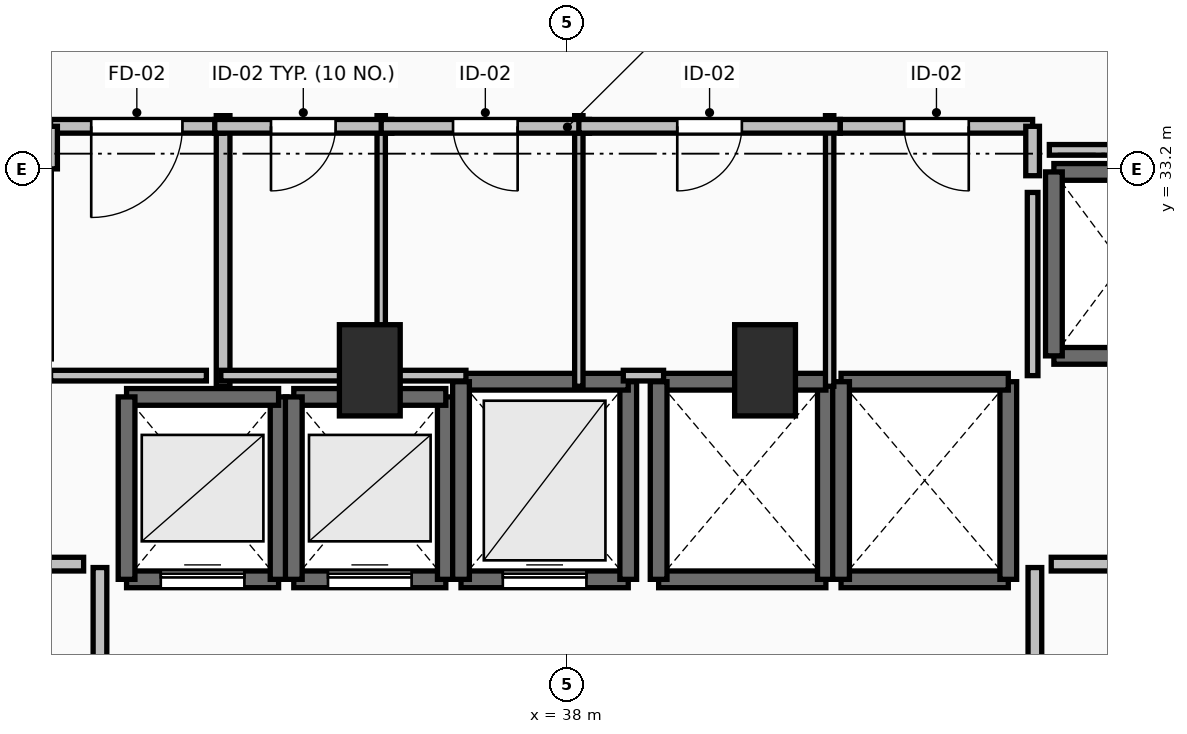
"""IFC4 building model, lengths in metres.
Left out: names, types, materials, properties, quantities, classifications, styles, units other than length and angle.
Written with IfcOpenShell. Run it as: python <this file> out.ifc"""

import sys

from ifc_helpers import new_model, si_unit, direction, frame, frame_2d, origin, origin_2d, place, context, subcontext, project, spatial, rectangle, extrude, element, fill, save


model = new_model("IFC4")
c1 = context("Model", 3, precision=1e-05, world=origin(), true_north=direction((0.0, 1.0)))
c2 = subcontext(c1, "Body", "Model", "MODEL_VIEW")
j1 = project(units=[si_unit("LENGTHUNIT", "METRE"), si_unit("PLANEANGLEUNIT", "RADIAN")], contexts=[c1])
p1 = place(None, origin())
s1 = spatial("IfcSite", under=j1, at=p1, CompositionType="ELEMENT")
p2 = place(p1, origin())
s2 = spatial("IfcBuilding", under=s1, at=p2, CompositionType="ELEMENT")
p3 = place(p2, frame((0.0, 0.0, 41.5)))
s3 = spatial("IfcBuildingStorey", under=s2, at=p3, CompositionType="ELEMENT", Elevation=41.5)
for number, where, z_axis, x_axis in (
    (1, (35.4, 30.55, 0.0), (0.0, 0.0, 1.0), (1.0, 0.0, 0.0)),
    (2, (40.6, 30.55, 0.0), (0.0, 0.0, 1.0), (1.0, 0.0, 0.0)),
):
    element("IfcColumn", number, at=place(p3, frame(where, z_axis=z_axis, x_axis=x_axis)), inside=s3, PredefinedType="PILASTER", context=c2, shape_type="SweptSolid", body=[
        extrude(rectangle(XDim=0.8, YDim=1.2, at=origin_2d()), origin(), (0.0, 0.0, 1.0), 3.5),
    ])
p4 = place(p3, frame((32.2, 27.8, 0.0), z_axis=(0.0, 0.0, 1.0), x_axis=(1.0, 0.0, 0.0)))
e3 = element("IfcWall", 3, at=p4, inside=s3, PredefinedType="SOLIDWALL", context=c2, shape_type="SweptSolid", body=[
    extrude(rectangle(XDim=2.0, YDim=0.22, at=frame_2d((1.0, 0.0))), origin(), (0.0, 0.0, 1.0), 3.24),
])
p5 = place(p4, frame((0.45, 0.0, 0.0)))
e4 = element("IfcOpeningElement", 4, at=p5, cuts=e3, PredefinedType="OPENING", context=c2, shape_type="SweptSolid", body=[
    extrude(rectangle(XDim=1.1, YDim=2.2, at=frame_2d((0.55, 1.1))), frame((0.0, 0.125, 0.0), z_axis=(0.0, -1.0, 0.0), x_axis=(1.0, 0.0, 0.0)), (0.0, 0.0, 1.0), 0.25),
])
p6 = place(p3, frame((34.2, 27.8, 0.0), z_axis=(0.0, 0.0, 1.0), x_axis=(0.0, 1.0, 0.0)))
e5 = element("IfcWall", 5, at=p6, inside=s3, PredefinedType="SOLIDWALL", context=c2, shape_type="SweptSolid", body=[
    extrude(rectangle(XDim=2.4, YDim=0.22, at=frame_2d((1.2, 0.0))), origin(), (0.0, 0.0, 1.0), 3.24),
])
p7 = place(p3, frame((34.2, 30.2, 0.0), z_axis=(0.0, 0.0, 1.0), x_axis=(-1.0, 0.0, 0.0)))
e6 = element("IfcWall", 6, at=p7, inside=s3, PredefinedType="SOLIDWALL", context=c2, shape_type="SweptSolid", body=[
    extrude(rectangle(XDim=2.0, YDim=0.22, at=frame_2d((1.0, 0.0))), origin(), (0.0, 0.0, 1.0), 3.24),
])
p8 = place(p3, frame((32.2, 30.2, 0.0), z_axis=(0.0, 0.0, 1.0), x_axis=(0.0, -1.0, 0.0)))
e7 = element("IfcWall", 7, at=p8, inside=s3, PredefinedType="SOLIDWALL", context=c2, shape_type="SweptSolid", body=[
    extrude(rectangle(XDim=2.4, YDim=0.22, at=frame_2d((1.2, 0.0))), origin(), (0.0, 0.0, 1.0), 3.24),
])
p9 = place(p3, frame((34.4, 27.8, 0.0), z_axis=(0.0, 0.0, 1.0), x_axis=(1.0, 0.0, 0.0)))
e8 = element("IfcWall", 8, at=p9, inside=s3, PredefinedType="SOLIDWALL", context=c2, shape_type="SweptSolid", body=[
    extrude(rectangle(XDim=2.0, YDim=0.22, at=frame_2d((1.0, 0.0))), origin(), (0.0, 0.0, 1.0), 3.24),
])
p10 = place(p9, frame((0.45, 0.0, 0.0)))
e9 = element("IfcOpeningElement", 9, at=p10, cuts=e8, PredefinedType="OPENING", context=c2, shape_type="SweptSolid", body=[
    extrude(rectangle(XDim=1.1, YDim=2.2, at=frame_2d((0.55, 1.1))), frame((0.0, 0.125, 0.0), z_axis=(0.0, -1.0, 0.0), x_axis=(1.0, 0.0, 0.0)), (0.0, 0.0, 1.0), 0.25),
])
p11 = place(p3, frame((36.4, 27.8, 0.0), z_axis=(0.0, 0.0, 1.0), x_axis=(0.0, 1.0, 0.0)))
e10 = element("IfcWall", 10, at=p11, inside=s3, PredefinedType="SOLIDWALL", context=c2, shape_type="SweptSolid", body=[
    extrude(rectangle(XDim=2.4, YDim=0.22, at=frame_2d((1.2, 0.0))), origin(), (0.0, 0.0, 1.0), 3.24),
])
p12 = place(p3, frame((36.4, 30.2, 0.0), z_axis=(0.0, 0.0, 1.0), x_axis=(-1.0, 0.0, 0.0)))
e11 = element("IfcWall", 11, at=p12, inside=s3, PredefinedType="SOLIDWALL", context=c2, shape_type="SweptSolid", body=[
    extrude(rectangle(XDim=2.0, YDim=0.22, at=frame_2d((1.0, 0.0))), origin(), (0.0, 0.0, 1.0), 3.24),
])
p13 = place(p3, frame((34.4, 30.2, 0.0), z_axis=(0.0, 0.0, 1.0), x_axis=(0.0, -1.0, 0.0)))
e12 = element("IfcWall", 12, at=p13, inside=s3, PredefinedType="SOLIDWALL", context=c2, shape_type="SweptSolid", body=[
    extrude(rectangle(XDim=2.4, YDim=0.22, at=frame_2d((1.2, 0.0))), origin(), (0.0, 0.0, 1.0), 3.24),
])
p14 = place(p3, frame((36.6, 27.8, 0.0), z_axis=(0.0, 0.0, 1.0), x_axis=(1.0, 0.0, 0.0)))
e13 = element("IfcWall", 13, at=p14, inside=s3, PredefinedType="SOLIDWALL", context=c2, shape_type="SweptSolid", body=[
    extrude(rectangle(XDim=2.2, YDim=0.22, at=frame_2d((1.1, 0.0))), origin(), (0.0, 0.0, 1.0), 3.24),
])
p15 = place(p14, frame((0.55, 0.0, 0.0)))
e14 = element("IfcOpeningElement", 14, at=p15, cuts=e13, PredefinedType="OPENING", context=c2, shape_type="SweptSolid", body=[
    extrude(rectangle(XDim=1.1, YDim=2.2, at=frame_2d((0.55, 1.1))), frame((0.0, 0.125, 0.0), z_axis=(0.0, -1.0, 0.0), x_axis=(1.0, 0.0, 0.0)), (0.0, 0.0, 1.0), 0.25),
])
p16 = place(p3, frame((38.8, 27.8, 0.0), z_axis=(0.0, 0.0, 1.0), x_axis=(0.0, 1.0, 0.0)))
e15 = element("IfcWall", 15, at=p16, inside=s3, PredefinedType="SOLIDWALL", context=c2, shape_type="SweptSolid", body=[
    extrude(rectangle(XDim=2.6, YDim=0.22, at=frame_2d((1.3, 0.0))), origin(), (0.0, 0.0, 1.0), 3.24),
])
p17 = place(p3, frame((38.8, 30.4, 0.0), z_axis=(0.0, 0.0, 1.0), x_axis=(-1.0, 0.0, 0.0)))
e16 = element("IfcWall", 16, at=p17, inside=s3, PredefinedType="SOLIDWALL", context=c2, shape_type="SweptSolid", body=[
    extrude(rectangle(XDim=2.2, YDim=0.22, at=frame_2d((1.1, 0.0))), origin(), (0.0, 0.0, 1.0), 3.24),
])
p18 = place(p3, frame((36.6, 30.4, 0.0), z_axis=(0.0, 0.0, 1.0), x_axis=(0.0, -1.0, 0.0)))
e17 = element("IfcWall", 17, at=p18, inside=s3, PredefinedType="SOLIDWALL", context=c2, shape_type="SweptSolid", body=[
    extrude(rectangle(XDim=2.6, YDim=0.22, at=frame_2d((1.3, 0.0))), origin(), (0.0, 0.0, 1.0), 3.24),
])
p19 = place(p3, frame((39.2, 27.8, 0.0), z_axis=(0.0, 0.0, 1.0), x_axis=(1.0, 0.0, 0.0)))
e18 = element("IfcWall", 18, at=p19, inside=s3, PredefinedType="SOLIDWALL", context=c2, shape_type="SweptSolid", body=[
    extrude(rectangle(XDim=2.2, YDim=0.22, at=frame_2d((1.1, 0.0))), origin(), (0.0, 0.0, 1.0), 3.24),
])
p20 = place(p3, frame((41.4, 27.8, 0.0), z_axis=(0.0, 0.0, 1.0), x_axis=(0.0, 1.0, 0.0)))
e19 = element("IfcWall", 19, at=p20, inside=s3, PredefinedType="SOLIDWALL", context=c2, shape_type="SweptSolid", body=[
    extrude(rectangle(XDim=2.6, YDim=0.22, at=frame_2d((1.3, 0.0))), origin(), (0.0, 0.0, 1.0), 3.24),
])
p21 = place(p3, frame((41.4, 30.4, 0.0), z_axis=(0.0, 0.0, 1.0), x_axis=(-1.0, 0.0, 0.0)))
e20 = element("IfcWall", 20, at=p21, inside=s3, PredefinedType="SOLIDWALL", context=c2, shape_type="SweptSolid", body=[
    extrude(rectangle(XDim=2.2, YDim=0.22, at=frame_2d((1.1, 0.0))), origin(), (0.0, 0.0, 1.0), 3.24),
])
p22 = place(p3, frame((39.2, 30.4, 0.0), z_axis=(0.0, 0.0, 1.0), x_axis=(0.0, -1.0, 0.0)))
e21 = element("IfcWall", 21, at=p22, inside=s3, PredefinedType="SOLIDWALL", context=c2, shape_type="SweptSolid", body=[
    extrude(rectangle(XDim=2.6, YDim=0.22, at=frame_2d((1.3, 0.0))), origin(), (0.0, 0.0, 1.0), 3.24),
])
p23 = place(p3, frame((41.6, 27.8, 0.0), z_axis=(0.0, 0.0, 1.0), x_axis=(1.0, 0.0, 0.0)))
e22 = element("IfcWall", 22, at=p23, inside=s3, PredefinedType="SOLIDWALL", context=c2, shape_type="SweptSolid", body=[
    extrude(rectangle(XDim=2.2, YDim=0.22, at=frame_2d((1.1, 0.0))), origin(), (0.0, 0.0, 1.0), 3.24),
])
p24 = place(p3, frame((43.8, 27.8, 0.0), z_axis=(0.0, 0.0, 1.0), x_axis=(0.0, 1.0, 0.0)))
e23 = element("IfcWall", 23, at=p24, inside=s3, PredefinedType="SOLIDWALL", context=c2, shape_type="SweptSolid", body=[
    extrude(rectangle(XDim=2.6, YDim=0.22, at=frame_2d((1.3, 0.0))), origin(), (0.0, 0.0, 1.0), 3.24),
])
p25 = place(p3, frame((43.8, 30.4, 0.0), z_axis=(0.0, 0.0, 1.0), x_axis=(-1.0, 0.0, 0.0)))
e24 = element("IfcWall", 24, at=p25, inside=s3, PredefinedType="SOLIDWALL", context=c2, shape_type="SweptSolid", body=[
    extrude(rectangle(XDim=2.2, YDim=0.22, at=frame_2d((1.1, 0.0))), origin(), (0.0, 0.0, 1.0), 3.24),
])
p26 = place(p3, frame((41.6, 30.4, 0.0), z_axis=(0.0, 0.0, 1.0), x_axis=(0.0, -1.0, 0.0)))
e25 = element("IfcWall", 25, at=p26, inside=s3, PredefinedType="SOLIDWALL", context=c2, shape_type="SweptSolid", body=[
    extrude(rectangle(XDim=2.6, YDim=0.22, at=frame_2d((1.3, 0.0))), origin(), (0.0, 0.0, 1.0), 3.24),
])
for number, where, z_axis, x_axis in (
    (26, (44.4, 30.74, 0.0), (0.0, 0.0, 1.0), (1.0, 0.0, 0.0)),
    (27, (46.2, 33.16, 0.0), (0.0, 0.0, 1.0), (-1.0, 0.0, 0.0)),
):
    element("IfcWall", number, at=place(p3, frame(where, z_axis=z_axis, x_axis=x_axis)), inside=s3, PredefinedType="SOLIDWALL", context=c2, shape_type="SweptSolid", body=[
        extrude(rectangle(XDim=1.8, YDim=0.22, at=frame_2d((0.9, 0.0))), origin(), (0.0, 0.0, 1.0), 3.24),
    ])
p27 = place(p3, frame((44.4, 33.16, 0.0), z_axis=(0.0, 0.0, 1.0), x_axis=(0.0, -1.0, 0.0)))
e28 = element("IfcWall", 28, at=p27, inside=s3, PredefinedType="SOLIDWALL", context=c2, shape_type="SweptSolid", body=[
    extrude(rectangle(XDim=2.42, YDim=0.22, at=frame_2d((1.21, 0.0))), origin(), (0.0, 0.0, 1.0), 3.24),
])
p28 = place(p3, frame((31.85, 24.045, 0.0), z_axis=(0.0, 0.0, 1.0), x_axis=(0.0, 1.0, 0.0)))
e29 = element("IfcWall", 29, at=p28, inside=s3, PredefinedType="PARTITIONING", context=c2, shape_type="SweptSolid", body=[
    extrude(rectangle(XDim=3.91, YDim=0.18, at=frame_2d((1.955, 0.0))), origin(), (0.0, 0.0, 1.0), 3.24),
])
p29 = place(p28, frame((1.355, 0.0, 0.0)))
e30 = element("IfcOpeningElement", 30, at=p29, cuts=e29, PredefinedType="OPENING", context=c2, shape_type="SweptSolid", body=[
    extrude(rectangle(XDim=1.2, YDim=2.15, at=frame_2d((0.6, 1.075))), frame((0.0, 0.105, 0.0), z_axis=(0.0, -1.0, 0.0), x_axis=(1.0, 0.0, 0.0)), (0.0, 0.0, 1.0), 0.21),
])
p30 = place(p3, frame((44.15, 27.955, 0.0), z_axis=(0.0, 0.0, 1.0), x_axis=(0.0, -1.0, 0.0)))
e31 = element("IfcWall", 31, at=p30, inside=s3, PredefinedType="PARTITIONING", context=c2, shape_type="SweptSolid", body=[
    extrude(rectangle(XDim=3.91, YDim=0.18, at=frame_2d((1.955, 0.0))), origin(), (0.0, 0.0, 1.0), 3.24),
])
p31 = place(p30, frame((1.355, 0.0, 0.0)))
e32 = element("IfcOpeningElement", 32, at=p31, cuts=e31, PredefinedType="OPENING", context=c2, shape_type="SweptSolid", body=[
    extrude(rectangle(XDim=1.2, YDim=2.15, at=frame_2d((0.6, 1.075))), frame((0.0, 0.105, 0.0), z_axis=(0.0, -1.0, 0.0), x_axis=(1.0, 0.0, 0.0)), (0.0, 0.0, 1.0), 0.21),
])
p32 = place(p3, frame((33.47, 30.34, 0.0), z_axis=(0.0, 0.0, 1.0), x_axis=(0.0, 1.0, 0.0)))
e33 = element("IfcWall", 33, at=p32, inside=s3, PredefinedType="PARTITIONING", context=c2, shape_type="SweptSolid", body=[
    extrude(rectangle(XDim=3.56, YDim=0.18, at=frame_2d((1.78, 0.0))), origin(), (0.0, 0.0, 1.0), 3.24),
])
p33 = place(p3, frame((33.47, 33.76, 0.0), z_axis=(0.0, 0.0, 1.0), x_axis=(-1.0, 0.0, 0.0)))
e34 = element("IfcWall", 34, at=p33, inside=s3, PredefinedType="PARTITIONING", context=c2, shape_type="SweptSolid", body=[
    extrude(rectangle(XDim=2.27, YDim=0.18, at=frame_2d((1.135, 0.0))), origin(), (0.0, 0.0, 1.0), 3.24),
])
p34 = place(p33, frame((0.535, 0.0, 0.0)))
e35 = element("IfcOpeningElement", 35, at=p34, cuts=e34, PredefinedType="OPENING", context=c2, shape_type="SweptSolid", body=[
    extrude(rectangle(XDim=1.2, YDim=2.15, at=frame_2d((0.6, 1.075))), frame((0.0, 0.105, 0.0), z_axis=(0.0, -1.0, 0.0), x_axis=(1.0, 0.0, 0.0)), (0.0, 0.0, 1.0), 0.21),
])
p35 = place(p3, frame((31.2, 33.76, 0.0), z_axis=(0.0, 0.0, 1.0), x_axis=(0.0, -1.0, 0.0)))
e36 = element("IfcWall", 36, at=p35, inside=s3, PredefinedType="PARTITIONING", context=c2, shape_type="SweptSolid", body=[
    extrude(rectangle(XDim=0.56, YDim=0.18, at=frame_2d((0.28, 0.0))), origin(), (0.0, 0.0, 1.0), 3.24),
])
p36 = place(p3, frame((35.55, 30.34, 0.0), z_axis=(0.0, 0.0, 1.0), x_axis=(0.0, 1.0, 0.0)))
e37 = element("IfcWall", 37, at=p36, inside=s3, PredefinedType="PARTITIONING", context=c2, shape_type="SweptSolid", body=[
    extrude(rectangle(XDim=3.56, YDim=0.11, at=frame_2d((1.78, 0.0))), origin(), (0.0, 0.0, 1.0), 2.432),
])
p37 = place(p3, frame((35.69, 33.76, 0.0), z_axis=(0.0, 0.0, 1.0), x_axis=(-1.0, 0.0, 0.0)))
e38 = element("IfcWall", 38, at=p37, inside=s3, PredefinedType="PARTITIONING", context=c2, shape_type="SweptSolid", body=[
    extrude(rectangle(XDim=2.33, YDim=0.18, at=frame_2d((1.165, 0.0))), origin(), (0.0, 0.0, 1.0), 3.24),
])
p38 = place(p37, frame((0.74, 0.0, 0.0)))
e39 = element("IfcOpeningElement", 39, at=p38, cuts=e38, PredefinedType="OPENING", context=c2, shape_type="SweptSolid", body=[
    extrude(rectangle(XDim=0.85, YDim=2.1, at=frame_2d((0.425, 1.05))), frame((0.0, 0.105, 0.0), z_axis=(0.0, -1.0, 0.0), x_axis=(1.0, 0.0, 0.0)), (0.0, 0.0, 1.0), 0.21),
])
p39 = place(p3, frame((38.15, 30.34, 0.0), z_axis=(0.0, 0.0, 1.0), x_axis=(0.0, 1.0, 0.0)))
e40 = element("IfcWall", 40, at=p39, inside=s3, PredefinedType="PARTITIONING", context=c2, shape_type="SweptSolid", body=[
    extrude(rectangle(XDim=3.56, YDim=0.11, at=frame_2d((1.78, 0.0))), origin(), (0.0, 0.0, 1.0), 2.432),
])
p40 = place(p3, frame((38.29, 33.76, 0.0), z_axis=(0.0, 0.0, 1.0), x_axis=(-1.0, 0.0, 0.0)))
e41 = element("IfcWall", 41, at=p40, inside=s3, PredefinedType="PARTITIONING", context=c2, shape_type="SweptSolid", body=[
    extrude(rectangle(XDim=2.74, YDim=0.18, at=frame_2d((1.37, 0.0))), origin(), (0.0, 0.0, 1.0), 3.24),
])
p41 = place(p40, frame((0.945, 0.0, 0.0)))
e42 = element("IfcOpeningElement", 42, at=p41, cuts=e41, PredefinedType="OPENING", context=c2, shape_type="SweptSolid", body=[
    extrude(rectangle(XDim=0.85, YDim=2.1, at=frame_2d((0.425, 1.05))), frame((0.0, 0.105, 0.0), z_axis=(0.0, -1.0, 0.0), x_axis=(1.0, 0.0, 0.0)), (0.0, 0.0, 1.0), 0.21),
])
p42 = place(p3, frame((41.45, 30.34, 0.0), z_axis=(0.0, 0.0, 1.0), x_axis=(0.0, 1.0, 0.0)))
e43 = element("IfcWall", 43, at=p42, inside=s3, PredefinedType="PARTITIONING", context=c2, shape_type="SweptSolid", body=[
    extrude(rectangle(XDim=3.56, YDim=0.11, at=frame_2d((1.78, 0.0))), origin(), (0.0, 0.0, 1.0), 3.24),
])
p43 = place(p3, frame((41.59, 33.76, 0.0), z_axis=(0.0, 0.0, 1.0), x_axis=(-1.0, 0.0, 0.0)))
e44 = element("IfcWall", 44, at=p43, inside=s3, PredefinedType="PARTITIONING", context=c2, shape_type="SweptSolid", body=[
    extrude(rectangle(XDim=3.44, YDim=0.18, at=frame_2d((1.72, 0.0))), origin(), (0.0, 0.0, 1.0), 3.24),
])
p44 = place(p43, frame((1.295, 0.0, 0.0)))
e45 = element("IfcOpeningElement", 45, at=p44, cuts=e44, PredefinedType="OPENING", context=c2, shape_type="SweptSolid", body=[
    extrude(rectangle(XDim=0.85, YDim=2.1, at=frame_2d((0.425, 1.05))), frame((0.0, 0.105, 0.0), z_axis=(0.0, -1.0, 0.0), x_axis=(1.0, 0.0, 0.0)), (0.0, 0.0, 1.0), 0.21),
])
p45 = place(p3, frame((44.12, 33.76, 0.0), z_axis=(0.0, 0.0, 1.0), x_axis=(-1.0, 0.0, 0.0)))
e46 = element("IfcWall", 46, at=p45, inside=s3, PredefinedType="PARTITIONING", context=c2, shape_type="SweptSolid", body=[
    extrude(rectangle(XDim=2.53, YDim=0.18, at=frame_2d((1.265, 0.0))), origin(), (0.0, 0.0, 1.0), 3.24),
])
p46 = place(p45, frame((0.84, 0.0, 0.0)))
e47 = element("IfcOpeningElement", 47, at=p46, cuts=e46, PredefinedType="OPENING", context=c2, shape_type="SweptSolid", body=[
    extrude(rectangle(XDim=0.85, YDim=2.1, at=frame_2d((0.425, 1.05))), frame((0.0, 0.105, 0.0), z_axis=(0.0, -1.0, 0.0), x_axis=(1.0, 0.0, 0.0)), (0.0, 0.0, 1.0), 0.21),
])
p47 = place(p3, frame((44.12, 33.11, 0.0), z_axis=(0.0, 0.0, 1.0), x_axis=(0.0, 1.0, 0.0)))
e48 = element("IfcWall", 48, at=p47, inside=s3, PredefinedType="PARTITIONING", context=c2, shape_type="SweptSolid", body=[
    extrude(rectangle(XDim=0.65, YDim=0.18, at=frame_2d((0.325, 0.0))), origin(), (0.0, 0.0, 1.0), 3.24),
])
for number, where, z_axis, x_axis in (
    (49, (31.635, 28.0, 0.0), (0.0, 0.0, 1.0), (-1.0, 0.0, 0.0)),
    (50, (45.28, 28.0, 0.0), (0.0, 0.0, 1.0), (-1.0, 0.0, 0.0)),
):
    element("IfcWall", number, at=place(p3, frame(where, z_axis=z_axis, x_axis=x_axis)), inside=s3, PredefinedType="PARTITIONING", context=c2, shape_type="SweptSolid", body=[
        extrude(rectangle(XDim=0.915, YDim=0.18, at=frame_2d((0.458, 0.0))), origin(), (0.0, 0.0, 1.0), 3.24),
    ])
p48 = place(p3, frame((31.2, 30.48, 0.0), z_axis=(0.0, 0.0, 1.0), x_axis=(1.0, 0.0, 0.0)))
e51 = element("IfcWall", 51, at=p48, inside=s3, PredefinedType="PARTITIONING", context=c2, shape_type="SweptSolid", body=[
    extrude(rectangle(XDim=2.05, YDim=0.14, at=frame_2d((1.025, 0.0))), origin(), (0.0, 0.0, 1.0), 3.24),
])
p49 = place(p3, frame((33.44, 30.48, 0.0), z_axis=(0.0, 0.0, 1.0), x_axis=(1.0, 0.0, 0.0)))
e52 = element("IfcWall", 52, at=p49, inside=s3, PredefinedType="PARTITIONING", context=c2, shape_type="SweptSolid", body=[
    extrude(rectangle(XDim=2.14, YDim=0.14, at=frame_2d((1.07, 0.0))), origin(), (0.0, 0.0, 1.0), 2.432),
])
p50 = place(p3, frame((35.6, 30.48, 0.0), z_axis=(0.0, 0.0, 1.0), x_axis=(1.0, 0.0, 0.0)))
e53 = element("IfcWall", 53, at=p50, inside=s3, PredefinedType="PARTITIONING", context=c2, shape_type="SweptSolid", body=[
    extrude(rectangle(XDim=1.065, YDim=0.14, at=frame_2d((0.532, 0.0))), origin(), (0.0, 0.0, 1.0), 2.432),
])
p51 = place(p3, frame((38.735, 30.48, 0.0), z_axis=(0.0, 0.0, 1.0), x_axis=(1.0, 0.0, 0.0)))
e54 = element("IfcWall", 54, at=p51, inside=s3, PredefinedType="PARTITIONING", context=c2, shape_type="SweptSolid", body=[
    extrude(rectangle(XDim=0.53, YDim=0.14, at=frame_2d((0.265, 0.0))), origin(), (0.0, 0.0, 1.0), 2.432),
])
p52 = place(p3, frame((44.12, 30.48, 0.0), z_axis=(0.0, 0.0, 1.0), x_axis=(0.0, 1.0, 0.0)))
e55 = element("IfcWall", 55, at=p52, inside=s3, PredefinedType="PARTITIONING", context=c2, shape_type="SweptSolid", body=[
    extrude(rectangle(XDim=2.41, YDim=0.14, at=frame_2d((1.205, 0.0))), origin(), (0.0, 0.0, 1.0), 3.24),
])
p53 = place(p3, frame((44.34, 33.45, 0.0), z_axis=(0.0, 0.0, 1.0), x_axis=(1.0, 0.0, 0.0)))
e56 = element("IfcWall", 56, at=p53, inside=s3, PredefinedType="PARTITIONING", context=c2, shape_type="SweptSolid", body=[
    extrude(rectangle(XDim=4.21, YDim=0.14, at=frame_2d((2.105, 0.0))), origin(), (0.0, 0.0, 1.0), 2.432),
])
p54 = place(p5, origin())
e57 = element("IfcDoor", 57, at=p54, inside=s3, OperationType="SLIDING_TO_LEFT", PredefinedType="DOOR", context=c2, shape_type="SweptSolid", body=[
    extrude(rectangle(XDim=1.1, YDim=2.2, at=frame_2d((0.55, 1.1))), frame((0.0, 0.025, 0.0), z_axis=(0.0, -1.0, 0.0), x_axis=(1.0, 0.0, 0.0)), (0.0, 0.0, 1.0), 0.05),
])
fill(e4, e57)
p55 = place(p10, origin())
e58 = element("IfcDoor", 58, at=p55, inside=s3, OperationType="SLIDING_TO_LEFT", PredefinedType="DOOR", context=c2, shape_type="SweptSolid", body=[
    extrude(rectangle(XDim=1.1, YDim=2.2, at=frame_2d((0.55, 1.1))), frame((0.0, 0.025, 0.0), z_axis=(0.0, -1.0, 0.0), x_axis=(1.0, 0.0, 0.0)), (0.0, 0.0, 1.0), 0.05),
])
fill(e9, e58)
p56 = place(p15, origin())
e59 = element("IfcDoor", 59, at=p56, inside=s3, OperationType="SLIDING_TO_LEFT", PredefinedType="DOOR", context=c2, shape_type="SweptSolid", body=[
    extrude(rectangle(XDim=1.1, YDim=2.2, at=frame_2d((0.55, 1.1))), frame((0.0, 0.025, 0.0), z_axis=(0.0, -1.0, 0.0), x_axis=(1.0, 0.0, 0.0)), (0.0, 0.0, 1.0), 0.05),
])
fill(e14, e59)
p57 = place(p34, origin())
e60 = element("IfcDoor", 60, at=p57, inside=s3, OperationType="SINGLE_SWING_RIGHT", PredefinedType="DOOR", context=c2, shape_type="SweptSolid", body=[
    extrude(rectangle(XDim=1.2, YDim=2.15, at=frame_2d((0.6, 1.075))), frame((0.0, 0.025, 0.0), z_axis=(0.0, -1.0, 0.0), x_axis=(1.0, 0.0, 0.0)), (0.0, 0.0, 1.0), 0.05),
])
fill(e35, e60)
p58 = place(p38, origin())
e61 = element("IfcDoor", 61, at=p58, inside=s3, OperationType="SINGLE_SWING_RIGHT", PredefinedType="DOOR", context=c2, shape_type="SweptSolid", body=[
    extrude(rectangle(XDim=0.85, YDim=2.1, at=frame_2d((0.425, 1.05))), frame((0.0, 0.025, 0.0), z_axis=(0.0, -1.0, 0.0), x_axis=(1.0, 0.0, 0.0)), (0.0, 0.0, 1.0), 0.05),
])
fill(e39, e61)
p59 = place(p41, origin())
e62 = element("IfcDoor", 62, at=p59, inside=s3, OperationType="SINGLE_SWING_LEFT", PredefinedType="DOOR", context=c2, shape_type="SweptSolid", body=[
    extrude(rectangle(XDim=0.85, YDim=2.1, at=frame_2d((0.425, 1.05))), frame((0.0, 0.025, 0.0), z_axis=(0.0, -1.0, 0.0), x_axis=(1.0, 0.0, 0.0)), (0.0, 0.0, 1.0), 0.05),
])
fill(e42, e62)
p60 = place(p44, origin())
e63 = element("IfcDoor", 63, at=p60, inside=s3, OperationType="SINGLE_SWING_RIGHT", PredefinedType="DOOR", context=c2, shape_type="SweptSolid", body=[
    extrude(rectangle(XDim=0.85, YDim=2.1, at=frame_2d((0.425, 1.05))), frame((0.0, 0.025, 0.0), z_axis=(0.0, -1.0, 0.0), x_axis=(1.0, 0.0, 0.0)), (0.0, 0.0, 1.0), 0.05),
])
fill(e45, e63)
p61 = place(p46, origin())
e64 = element("IfcDoor", 64, at=p61, inside=s3, OperationType="SINGLE_SWING_LEFT", PredefinedType="DOOR", context=c2, shape_type="SweptSolid", body=[
    extrude(rectangle(XDim=0.85, YDim=2.1, at=frame_2d((0.425, 1.05))), frame((0.0, 0.025, 0.0), z_axis=(0.0, -1.0, 0.0), x_axis=(1.0, 0.0, 0.0)), (0.0, 0.0, 1.0), 0.05),
])
fill(e47, e64)
save(model, sys.argv[1])
